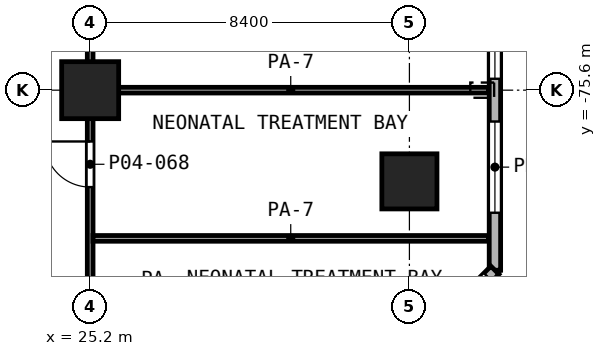
"""IFC4 building model, lengths in metres.
Left out: names, types, materials, properties, quantities, classifications, styles, units other than length and angle.
Written with IfcOpenShell. Run it as: python <this file> out.ifc"""

import sys

from ifc_helpers import new_model, si_unit, direction, frame, frame_2d, origin, origin_2d, place, context, subcontext, project, spatial, rectangle, extrude, element, fill, save


model = new_model("IFC4")
c1 = context("Model", 3, precision=1e-05, world=origin(), true_north=direction((0.0, 1.0)))
c2 = subcontext(c1, "Body", "Model", "MODEL_VIEW")
j1 = project(units=[si_unit("LENGTHUNIT", "METRE"), si_unit("PLANEANGLEUNIT", "RADIAN")], contexts=[c1])
p1 = place(None, origin())
s1 = spatial("IfcSite", under=j1, at=p1, CompositionType="ELEMENT")
p2 = place(p1, origin())
s2 = spatial("IfcBuilding", under=s1, at=p2, CompositionType="ELEMENT")
p3 = place(p2, frame((0.0, 0.0, 18.2)))
s3 = spatial("IfcBuildingStorey", under=s2, at=p3, CompositionType="ELEMENT", Elevation=18.2)
p4 = place(p3, frame((25.2, -75.6, 0.0), z_axis=(0.0, 0.0, 1.0), x_axis=(1.0, 0.0, 0.0)))
e1 = element("IfcColumn", 1, at=p4, inside=s3, PredefinedType="COLUMN", context=c2, shape_type="SweptSolid", body=[
    extrude(rectangle(XDim=1.5, YDim=1.5, at=origin_2d()), origin(), (0.0, 0.0, 1.0), 5.6),
])
p5 = place(p3, frame((33.6, -78.0, 0.0), z_axis=(0.0, 0.0, 1.0), x_axis=(1.0, 0.0, 0.0)))
e2 = element("IfcColumn", 2, at=p5, inside=s3, PredefinedType="COLUMN", context=c2, shape_type="SweptSolid", body=[
    extrude(rectangle(XDim=1.45, YDim=1.45, at=origin_2d()), origin(), (0.0, 0.0, 1.0), 5.6),
])
p6 = place(p3, frame((35.85, -80.338, 0.0), z_axis=(0.0, 0.0, 1.0), x_axis=(0.0, 1.0, 0.0)))
e3 = element("IfcWall", 3, at=p6, inside=s3, PredefinedType="SOLIDWALL", context=c2, shape_type="SweptSolid", body=[
    extrude(rectangle(XDim=38.4, YDim=0.3, at=frame_2d((19.2, 0.0))), origin(), (0.0, 0.0, 1.0), 5.05),
])
p7 = place(p6, frame((1.513, 0.0, 0.9)))
e4 = element("IfcOpeningElement", 4, at=p7, cuts=e3, PredefinedType="OPENING", context=c2, shape_type="SweptSolid", body=[
    extrude(rectangle(XDim=2.4, YDim=3.0, at=frame_2d((1.2, 1.5))), frame((0.0, 0.16, 0.0), z_axis=(0.0, -1.0, 0.0), x_axis=(1.0, 0.0, 0.0)), (0.0, 0.0, 1.0), 0.32),
])
p8 = place(p6, frame((5.038, 0.0, 0.9)))
e5 = element("IfcOpeningElement", 5, at=p8, cuts=e3, PredefinedType="OPENING", context=c2, shape_type="SweptSolid", body=[
    extrude(rectangle(XDim=3.6, YDim=3.0, at=frame_2d((1.8, 1.5))), frame((0.0, 0.16, 0.0), z_axis=(0.0, -1.0, 0.0), x_axis=(1.0, 0.0, 0.0)), (0.0, 0.0, 1.0), 0.32),
])
p9 = place(p6, frame((9.238, 0.0, 0.9)))
e6 = element("IfcOpeningElement", 6, at=p9, cuts=e3, PredefinedType="OPENING", context=c2, shape_type="SweptSolid", body=[
    extrude(rectangle(XDim=3.6, YDim=3.0, at=frame_2d((1.8, 1.5))), frame((0.0, 0.16, 0.0), z_axis=(0.0, -1.0, 0.0), x_axis=(1.0, 0.0, 0.0)), (0.0, 0.0, 1.0), 0.32),
])
p10 = place(p6, frame((13.438, 0.0, 0.9)))
e7 = element("IfcOpeningElement", 7, at=p10, cuts=e3, PredefinedType="OPENING", context=c2, shape_type="SweptSolid", body=[
    extrude(rectangle(XDim=3.6, YDim=3.0, at=frame_2d((1.8, 1.5))), frame((0.0, 0.16, 0.0), z_axis=(0.0, -1.0, 0.0), x_axis=(1.0, 0.0, 0.0)), (0.0, 0.0, 1.0), 0.32),
])
p11 = place(p6, frame((17.638, 0.0, 0.9)))
e8 = element("IfcOpeningElement", 8, at=p11, cuts=e3, PredefinedType="OPENING", context=c2, shape_type="SweptSolid", body=[
    extrude(rectangle(XDim=3.6, YDim=3.0, at=frame_2d((1.8, 1.5))), frame((0.0, 0.16, 0.0), z_axis=(0.0, -1.0, 0.0), x_axis=(1.0, 0.0, 0.0)), (0.0, 0.0, 1.0), 0.32),
])
p12 = place(p6, frame((21.838, 0.0, 0.9)))
e9 = element("IfcOpeningElement", 9, at=p12, cuts=e3, PredefinedType="OPENING", context=c2, shape_type="SweptSolid", body=[
    extrude(rectangle(XDim=3.6, YDim=3.0, at=frame_2d((1.8, 1.5))), frame((0.0, 0.16, 0.0), z_axis=(0.0, -1.0, 0.0), x_axis=(1.0, 0.0, 0.0)), (0.0, 0.0, 1.0), 0.32),
])
p13 = place(p6, frame((26.038, 0.0, 0.9)))
e10 = element("IfcOpeningElement", 10, at=p13, cuts=e3, PredefinedType="OPENING", context=c2, shape_type="SweptSolid", body=[
    extrude(rectangle(XDim=3.6, YDim=3.0, at=frame_2d((1.8, 1.5))), frame((0.0, 0.16, 0.0), z_axis=(0.0, -1.0, 0.0), x_axis=(1.0, 0.0, 0.0)), (0.0, 0.0, 1.0), 0.32),
])
p14 = place(p6, frame((30.238, 0.0, 0.9)))
e11 = element("IfcOpeningElement", 11, at=p14, cuts=e3, PredefinedType="OPENING", context=c2, shape_type="SweptSolid", body=[
    extrude(rectangle(XDim=3.6, YDim=3.0, at=frame_2d((1.8, 1.5))), frame((0.0, 0.16, 0.0), z_axis=(0.0, -1.0, 0.0), x_axis=(1.0, 0.0, 0.0)), (0.0, 0.0, 1.0), 0.32),
])
p15 = place(p6, frame((34.438, 0.0, 0.9)))
e12 = element("IfcOpeningElement", 12, at=p15, cuts=e3, PredefinedType="OPENING", context=c2, shape_type="SweptSolid", body=[
    extrude(rectangle(XDim=3.6, YDim=3.0, at=frame_2d((1.8, 1.5))), frame((0.0, 0.16, 0.0), z_axis=(0.0, -1.0, 0.0), x_axis=(1.0, 0.0, 0.0)), (0.0, 0.0, 1.0), 0.32),
])
p16 = place(p3, frame((29.938, -86.25, 0.0), z_axis=(0.0, 0.0, 1.0), x_axis=(0.707106781187, 0.707106781187, 0.0)))
e13 = element("IfcWall", 13, at=p16, inside=s3, PredefinedType="SOLIDWALL", context=c2, shape_type="SweptSolid", body=[
    extrude(rectangle(XDim=8.361, YDim=0.3, at=frame_2d((4.181, 0.0))), origin(), (0.0, 0.0, 1.0), 5.05),
])
p17 = place(p16, frame((0.259, 0.0, 0.9)))
e14 = element("IfcOpeningElement", 14, at=p17, cuts=e13, PredefinedType="OPENING", context=c2, shape_type="SweptSolid", body=[
    extrude(rectangle(XDim=3.6, YDim=3.0, at=frame_2d((1.8, 1.5))), frame((0.0, 0.16, 0.0), z_axis=(0.0, -1.0, 0.0), x_axis=(1.0, 0.0, 0.0)), (0.0, 0.0, 1.0), 0.32),
])
p18 = place(p16, frame((4.502, 0.0, 0.9)))
e15 = element("IfcOpeningElement", 15, at=p18, cuts=e13, PredefinedType="OPENING", context=c2, shape_type="SweptSolid", body=[
    extrude(rectangle(XDim=3.6, YDim=3.0, at=frame_2d((1.8, 1.5))), frame((0.0, 0.16, 0.0), z_axis=(0.0, -1.0, 0.0), x_axis=(1.0, 0.0, 0.0)), (0.0, 0.0, 1.0), 0.32),
])
for number, where, z_axis, x_axis in (
    (16, (25.275, -79.5, 0.0), (0.0, 0.0, 1.0), (1.0, 0.0, 0.0)),
    (17, (25.275, -75.6, 0.0), (0.0, 0.0, 1.0), (1.0, 0.0, 0.0)),
):
    element("IfcWall", number, at=place(p3, frame(where, z_axis=z_axis, x_axis=x_axis)), inside=s3, PredefinedType="PARTITIONING", context=c2, shape_type="SweptSolid", body=[
        extrude(rectangle(XDim=10.405, YDim=0.15, at=frame_2d((5.203, 0.0))), origin(), (0.0, 0.0, 1.0), 3.65),
    ])
p19 = place(p3, frame((25.2, -81.3, 0.0), z_axis=(0.0, 0.0, 1.0), x_axis=(0.0, 1.0, 0.0)))
e18 = element("IfcWall", 18, at=p19, inside=s3, PredefinedType="PARTITIONING", context=c2, shape_type="SweptSolid", body=[
    extrude(rectangle(XDim=56.1, YDim=0.15, at=frame_2d((28.05, 0.0))), origin(), (0.0, 0.0, 1.0), 5.05),
])
p20 = place(p19, frame((48.5, 0.0, 0.0)))
e19 = element("IfcOpeningElement", 19, at=p20, cuts=e18, PredefinedType="OPENING", context=c2, shape_type="SweptSolid", body=[
    extrude(rectangle(XDim=1.2, YDim=2.1, at=frame_2d((0.6, 1.05))), frame((0.0, 0.085, 0.0), z_axis=(0.0, -1.0, 0.0), x_axis=(1.0, 0.0, 0.0)), (0.0, 0.0, 1.0), 0.17),
])
p21 = place(p19, frame((40.1, 0.0, 0.0)))
e20 = element("IfcOpeningElement", 20, at=p21, cuts=e18, PredefinedType="OPENING", context=c2, shape_type="SweptSolid", body=[
    extrude(rectangle(XDim=1.2, YDim=2.1, at=frame_2d((0.6, 1.05))), frame((0.0, 0.085, 0.0), z_axis=(0.0, -1.0, 0.0), x_axis=(1.0, 0.0, 0.0)), (0.0, 0.0, 1.0), 0.17),
])
p22 = place(p19, frame((37.3, 0.0, 0.0)))
e21 = element("IfcOpeningElement", 21, at=p22, cuts=e18, PredefinedType="OPENING", context=c2, shape_type="SweptSolid", body=[
    extrude(rectangle(XDim=1.2, YDim=2.1, at=frame_2d((0.6, 1.05))), frame((0.0, 0.085, 0.0), z_axis=(0.0, -1.0, 0.0), x_axis=(1.0, 0.0, 0.0)), (0.0, 0.0, 1.0), 0.17),
])
p23 = place(p19, frame((28.9, 0.0, 0.0)))
e22 = element("IfcOpeningElement", 22, at=p23, cuts=e18, PredefinedType="OPENING", context=c2, shape_type="SweptSolid", body=[
    extrude(rectangle(XDim=1.2, YDim=2.1, at=frame_2d((0.6, 1.05))), frame((0.0, 0.085, 0.0), z_axis=(0.0, -1.0, 0.0), x_axis=(1.0, 0.0, 0.0)), (0.0, 0.0, 1.0), 0.17),
])
p24 = place(p19, frame((23.3, 0.0, 0.0)))
e23 = element("IfcOpeningElement", 23, at=p24, cuts=e18, PredefinedType="OPENING", context=c2, shape_type="SweptSolid", body=[
    extrude(rectangle(XDim=1.2, YDim=2.1, at=frame_2d((0.6, 1.05))), frame((0.0, 0.085, 0.0), z_axis=(0.0, -1.0, 0.0), x_axis=(1.0, 0.0, 0.0)), (0.0, 0.0, 1.0), 0.17),
])
p25 = place(p19, frame((20.6, 0.0, 0.0)))
e24 = element("IfcOpeningElement", 24, at=p25, cuts=e18, PredefinedType="OPENING", context=c2, shape_type="SweptSolid", body=[
    extrude(rectangle(XDim=1.1, YDim=2.1, at=frame_2d((0.55, 1.05))), frame((0.0, 0.085, 0.0), z_axis=(0.0, -1.0, 0.0), x_axis=(1.0, 0.0, 0.0)), (0.0, 0.0, 1.0), 0.17),
])
p26 = place(p19, frame((14.9, 0.0, 0.0)))
e25 = element("IfcOpeningElement", 25, at=p26, cuts=e18, PredefinedType="OPENING", context=c2, shape_type="SweptSolid", body=[
    extrude(rectangle(XDim=1.1, YDim=2.1, at=frame_2d((0.55, 1.05))), frame((0.0, 0.085, 0.0), z_axis=(0.0, -1.0, 0.0), x_axis=(1.0, 0.0, 0.0)), (0.0, 0.0, 1.0), 0.17),
])
p27 = place(p19, frame((7.5, 0.0, 0.0)))
e26 = element("IfcOpeningElement", 26, at=p27, cuts=e18, PredefinedType="OPENING", context=c2, shape_type="SweptSolid", body=[
    extrude(rectangle(XDim=1.2, YDim=2.1, at=frame_2d((0.6, 1.05))), frame((0.0, 0.085, 0.0), z_axis=(0.0, -1.0, 0.0), x_axis=(1.0, 0.0, 0.0)), (0.0, 0.0, 1.0), 0.17),
])
p28 = place(p19, frame((11.7, 0.0, 0.0)))
e27 = element("IfcOpeningElement", 27, at=p28, cuts=e18, PredefinedType="OPENING", context=c2, shape_type="SweptSolid", body=[
    extrude(rectangle(XDim=1.2, YDim=2.1, at=frame_2d((0.6, 1.05))), frame((0.0, 0.085, 0.0), z_axis=(0.0, -1.0, 0.0), x_axis=(1.0, 0.0, 0.0)), (0.0, 0.0, 1.0), 0.17),
])
p29 = place(p19, frame((3.15, 0.0, 0.0)))
e28 = element("IfcOpeningElement", 28, at=p29, cuts=e18, PredefinedType="OPENING", context=c2, shape_type="SweptSolid", body=[
    extrude(rectangle(XDim=1.2, YDim=2.1, at=frame_2d((0.6, 1.05))), frame((0.0, 0.085, 0.0), z_axis=(0.0, -1.0, 0.0), x_axis=(1.0, 0.0, 0.0)), (0.0, 0.0, 1.0), 0.17),
])
p30 = place(p7, origin())
e29 = element("IfcWindow", 29, at=p30, inside=s3, PartitioningType="SINGLE_PANEL", PredefinedType="WINDOW", context=c2, shape_type="SweptSolid", body=[
    extrude(rectangle(XDim=2.4, YDim=3.0, at=frame_2d((1.2, 1.5))), frame((0.0, 0.03, 0.0), z_axis=(0.0, -1.0, 0.0), x_axis=(1.0, 0.0, 0.0)), (0.0, 0.0, 1.0), 0.06),
])
fill(e4, e29)
p31 = place(p8, origin())
e30 = element("IfcWindow", 30, at=p31, inside=s3, PartitioningType="SINGLE_PANEL", PredefinedType="WINDOW", context=c2, shape_type="SweptSolid", body=[
    extrude(rectangle(XDim=3.6, YDim=3.0, at=frame_2d((1.8, 1.5))), frame((0.0, 0.03, 0.0), z_axis=(0.0, -1.0, 0.0), x_axis=(1.0, 0.0, 0.0)), (0.0, 0.0, 1.0), 0.06),
])
fill(e5, e30)
p32 = place(p18, origin())
e31 = element("IfcWindow", 31, at=p32, inside=s3, PartitioningType="SINGLE_PANEL", PredefinedType="WINDOW", context=c2, shape_type="SweptSolid", body=[
    extrude(rectangle(XDim=3.6, YDim=3.0, at=frame_2d((1.8, 1.5))), frame((0.0, 0.03, 0.0), z_axis=(0.0, -1.0, 0.0), x_axis=(1.0, 0.0, 0.0)), (0.0, 0.0, 1.0), 0.06),
])
fill(e15, e31)
p33 = place(p29, origin())
e32 = element("IfcDoor", 32, at=p33, inside=s3, OperationType="SINGLE_SWING_RIGHT", PredefinedType="DOOR", context=c2, shape_type="SweptSolid", body=[
    extrude(rectangle(XDim=1.2, YDim=2.1, at=frame_2d((0.6, 1.05))), frame((0.0, 0.025, 0.0), z_axis=(0.0, -1.0, 0.0), x_axis=(1.0, 0.0, 0.0)), (0.0, 0.0, 1.0), 0.05),
])
fill(e28, e32)
save(model, sys.argv[1])
